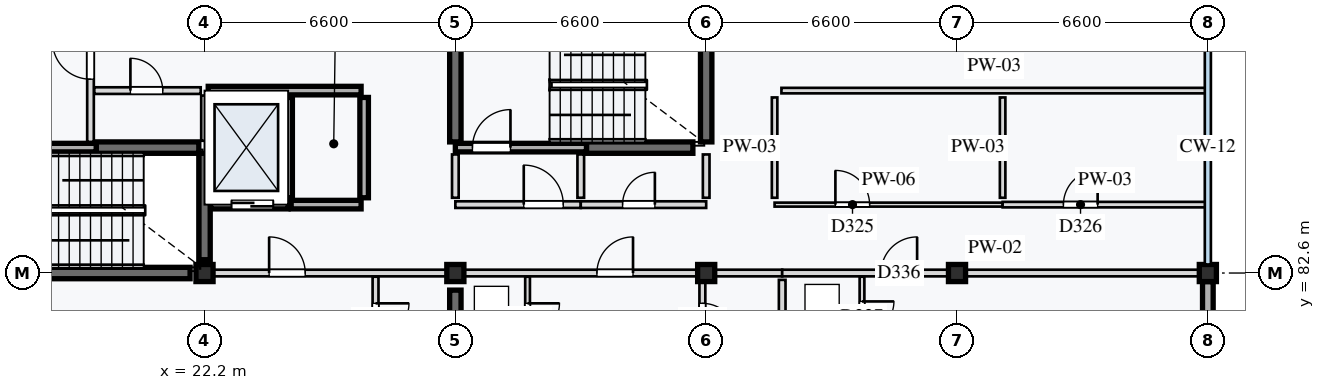
"""IFC4 building model, lengths in metres.
Left out: names, types, materials, properties, quantities, classifications, styles, units other than length and angle.
Written with IfcOpenShell. Run it as: python <this file> out.ifc"""

import sys

from ifc_helpers import new_model, si_unit, direction, frame, frame_2d, origin, origin_2d, place, context, subcontext, project, spatial, rectangle, extrude, element, fill, save


model = new_model("IFC4")
c1 = context("Model", 3, precision=1e-05, world=origin(), true_north=direction((0.0, 1.0)))
c2 = subcontext(c1, "Body", "Model", "MODEL_VIEW")
j1 = project(units=[si_unit("LENGTHUNIT", "METRE"), si_unit("PLANEANGLEUNIT", "RADIAN")], contexts=[c1])
p1 = place(None, origin())
s1 = spatial("IfcSite", under=j1, at=p1, CompositionType="ELEMENT")
p2 = place(p1, origin())
s2 = spatial("IfcBuilding", under=s1, at=p2, CompositionType="ELEMENT")
p3 = place(p2, frame((0.0, 0.0, 34.0)))
s3 = spatial("IfcBuildingStorey", under=s2, at=p3, CompositionType="ELEMENT", Elevation=34.0)
for number, where, z_axis, x_axis in (
    (1, (22.2, 82.6, 0.0), (0.0, 0.0, 1.0), (1.0, 0.0, 0.0)),
    (2, (28.8, 82.6, 0.0), (0.0, 0.0, 1.0), (1.0, 0.0, 0.0)),
    (3, (35.4, 82.6, 0.0), (0.0, 0.0, 1.0), (1.0, 0.0, 0.0)),
    (4, (42.0, 82.6, 0.0), (0.0, 0.0, 1.0), (1.0, 0.0, 0.0)),
    (5, (48.6, 82.6, 0.0), (0.0, 0.0, 1.0), (1.0, 0.0, 0.0)),
):
    element("IfcColumn", number, at=place(p3, frame(where, z_axis=z_axis, x_axis=x_axis)), inside=s3, PredefinedType="COLUMN", context=c2, shape_type="SweptSolid", body=[
        extrude(rectangle(XDim=0.45, YDim=0.45, at=origin_2d()), origin(), (0.0, 0.0, 1.0), 3.2),
    ])
p4 = place(p3, frame((15.98, 82.6, 0.0), z_axis=(0.0, 0.0, 1.0), x_axis=(1.0, 0.0, 0.0)))
e6 = element("IfcWall", 6, at=p4, inside=s3, PredefinedType="SHEAR", context=c2, shape_type="SweptSolid", body=[
    extrude(rectangle(XDim=5.84, YDim=0.3, at=frame_2d((2.92, 0.0))), origin(), (0.0, 0.0, 1.0), 2.97),
])
p5 = place(p3, frame((19.35, 85.9, 0.0), z_axis=(0.0, 0.0, 1.0), x_axis=(1.0, 0.0, 0.0)))
e7 = element("IfcWall", 7, at=p5, inside=s3, PredefinedType="SHEAR", context=c2, shape_type="SweptSolid", body=[
    extrude(rectangle(XDim=2.7, YDim=0.3, at=frame_2d((1.35, 0.0))), origin(), (0.0, 0.0, 1.0), 2.97),
])
for number, where, z_axis, x_axis in (
    (8, (22.2, 82.95, 0.0), (0.0, 0.0, 1.0), (0.0, 1.0, 0.0)),
    (9, (32.25, 85.9, 0.0), (0.0, 0.0, 1.0), (1.0, 0.0, 0.0)),
    (10, (28.8, 86.05, 0.0), (0.0, 0.0, 1.0), (0.0, 1.0, 0.0)),
    (11, (35.4, 86.05, 0.0), (0.0, 0.0, 1.0), (0.0, 1.0, 0.0)),
):
    element("IfcWall", number, at=place(p3, frame(where, z_axis=z_axis, x_axis=x_axis)), inside=s3, PredefinedType="SHEAR", context=c2, shape_type="SweptSolid", body=[
        extrude(rectangle(XDim=2.8, YDim=0.3, at=frame_2d((1.4, 0.0))), origin(), (0.0, 0.0, 1.0), 2.97),
    ])
p6 = place(p3, frame((28.8, 76.45, 0.0), z_axis=(0.0, 0.0, 1.0), x_axis=(0.0, 1.0, 0.0)))
e12 = element("IfcWall", 12, at=p6, inside=s3, PredefinedType="SHEAR", context=c2, shape_type="SweptSolid", body=[
    extrude(rectangle(XDim=5.7, YDim=0.3, at=frame_2d((2.85, 0.0))), origin(), (0.0, 0.0, 1.0), 2.97),
])
p7 = place(p3, frame((48.6, 76.225, 0.0), z_axis=(0.0, 0.0, 1.0), x_axis=(0.0, 1.0, 0.0)))
e13 = element("IfcWall", 13, at=p7, inside=s3, PredefinedType="STANDARD", context=c2, shape_type="SweptSolid", body=[
    extrude(rectangle(XDim=6.15, YDim=0.28, at=frame_2d((3.075, 0.0))), origin(), (0.0, 0.0, 1.0), 2.65),
])
p8 = place(p3, frame((15.75, 85.9, 0.0), z_axis=(0.0, 0.0, 1.0), x_axis=(1.0, 0.0, 0.0)))
e14 = element("IfcWall", 14, at=p8, inside=s3, PredefinedType="STANDARD", context=c2, shape_type="SweptSolid", body=[
    extrude(rectangle(XDim=3.6, YDim=0.225, at=frame_2d((1.8, 0.0))), origin(), (0.0, 0.0, 1.0), 2.97),
])
p9 = place(p8, frame((0.45, 0.0, 0.0)))
e15 = element("IfcOpeningElement", 15, at=p9, cuts=e14, PredefinedType="OPENING", context=c2, shape_type="SweptSolid", body=[
    extrude(rectangle(XDim=1.0, YDim=2.1, at=frame_2d((0.5, 1.05))), frame((0.0, 0.123, 0.0), z_axis=(0.0, -1.0, 0.0), x_axis=(1.0, 0.0, 0.0)), (0.0, 0.0, 1.0), 0.245),
])
p10 = place(p3, frame((19.2, 86.05, 0.0), z_axis=(0.0, 0.0, 1.0), x_axis=(0.0, 1.0, 0.0)))
e16 = element("IfcWall", 16, at=p10, inside=s3, PredefinedType="PARTITIONING", context=c2, shape_type="SweptSolid", body=[
    extrude(rectangle(XDim=3.0, YDim=0.175, at=frame_2d((1.5, 0.0))), origin(), (0.0, 0.0, 1.0), 2.97),
])
p11 = place(p10, frame((1.65, 0.0, 0.0)))
e17 = element("IfcOpeningElement", 17, at=p11, cuts=e16, PredefinedType="OPENING", context=c2, shape_type="SweptSolid", body=[
    extrude(rectangle(XDim=1.0, YDim=2.16, at=frame_2d((0.5, 1.08))), frame((0.0, 0.097, 0.0), z_axis=(0.0, -1.0, 0.0), x_axis=(1.0, 0.0, 0.0)), (0.0, 0.0, 1.0), 0.195),
])
p12 = place(p3, frame((19.3, 87.4, 0.0), z_axis=(0.0, 0.0, 1.0), x_axis=(1.0, 0.0, 0.0)))
e18 = element("IfcWall", 18, at=p12, inside=s3, PredefinedType="PARTITIONING", context=c2, shape_type="SweptSolid", body=[
    extrude(rectangle(XDim=2.8, YDim=0.175, at=frame_2d((1.4, 0.0))), origin(), (0.0, 0.0, 1.0), 2.97),
])
p13 = place(p12, frame((0.95, 0.0, 0.0)))
e19 = element("IfcOpeningElement", 19, at=p13, cuts=e18, PredefinedType="OPENING", context=c2, shape_type="SweptSolid", body=[
    extrude(rectangle(XDim=0.85, YDim=2.0, at=frame_2d((0.425, 1.0))), frame((0.0, 0.097, 0.0), z_axis=(0.0, -1.0, 0.0), x_axis=(1.0, 0.0, 0.0)), (0.0, 0.0, 1.0), 0.195),
])
p14 = place(p3, frame((22.2, 86.08, 0.0), z_axis=(0.0, 0.0, 1.0), x_axis=(0.0, 1.0, 0.0)))
e20 = element("IfcWall", 20, at=p14, inside=s3, PredefinedType="PARTITIONING", context=c2, shape_type="SweptSolid", body=[
    extrude(rectangle(XDim=1.19, YDim=0.175, at=frame_2d((0.595, 0.0))), origin(), (0.0, 0.0, 1.0), 2.97),
])
p15 = place(p3, frame((22.36, 84.4, 0.0), z_axis=(0.0, 0.0, 1.0), x_axis=(1.0, 0.0, 0.0)))
e21 = element("IfcWall", 21, at=p15, inside=s3, PredefinedType="STANDARD", context=c2, shape_type="SweptSolid", body=[
    extrude(rectangle(XDim=2.04, YDim=0.225, at=frame_2d((1.02, 0.0))), origin(), (0.0, 0.0, 1.0), 2.97),
])
p16 = place(p15, frame((0.55, 0.0, 0.0)))
e22 = element("IfcOpeningElement", 22, at=p16, cuts=e21, PredefinedType="OPENING", context=c2, shape_type="SweptSolid", body=[
    extrude(rectangle(XDim=1.1, YDim=2.1, at=frame_2d((0.55, 1.05))), frame((0.0, 0.123, 0.0), z_axis=(0.0, -1.0, 0.0), x_axis=(1.0, 0.0, 0.0)), (0.0, 0.0, 1.0), 0.245),
])
p17 = place(p3, frame((24.48, 84.4, 0.0), z_axis=(0.0, 0.0, 1.0), x_axis=(1.0, 0.0, 0.0)))
e23 = element("IfcWall", 23, at=p17, inside=s3, PredefinedType="STANDARD", context=c2, shape_type="SweptSolid", body=[
    extrude(rectangle(XDim=1.84, YDim=0.225, at=frame_2d((0.92, 0.0))), origin(), (0.0, 0.0, 1.0), 2.97),
])
p18 = place(p3, frame((22.298, 87.4, 0.0), z_axis=(0.0, 0.0, 1.0), x_axis=(1.0, 0.0, 0.0)))
e24 = element("IfcWall", 24, at=p18, inside=s3, PredefinedType="STANDARD", context=c2, shape_type="SweptSolid", body=[
    extrude(rectangle(XDim=4.022, YDim=0.225, at=frame_2d((2.011, 0.0))), origin(), (0.0, 0.0, 1.0), 2.97),
])
for number, where, z_axis, x_axis in (
    (25, (24.4, 84.58, 0.0), (0.0, 0.0, 1.0), (0.0, 1.0, 0.0)),
    (26, (26.4, 84.58, 0.0), (0.0, 0.0, 1.0), (0.0, 1.0, 0.0)),
):
    element("IfcWall", number, at=place(p3, frame(where, z_axis=z_axis, x_axis=x_axis)), inside=s3, PredefinedType="STANDARD", context=c2, shape_type="SweptSolid", body=[
        extrude(rectangle(XDim=2.64, YDim=0.225, at=frame_2d((1.32, 0.0))), origin(), (0.0, 0.0, 1.0), 2.97),
    ])
p19 = place(p3, frame((28.8, 85.9, 0.0), z_axis=(0.0, 0.0, 1.0), x_axis=(1.0, 0.0, 0.0)))
e27 = element("IfcWall", 27, at=p19, inside=s3, PredefinedType="STANDARD", context=c2, shape_type="SweptSolid", body=[
    extrude(rectangle(XDim=3.45, YDim=0.225, at=frame_2d((1.725, 0.0))), origin(), (0.0, 0.0, 1.0), 2.97),
])
p20 = place(p19, frame((0.45, 0.0, 0.0)))
e28 = element("IfcOpeningElement", 28, at=p20, cuts=e27, PredefinedType="OPENING", context=c2, shape_type="SweptSolid", body=[
    extrude(rectangle(XDim=1.0, YDim=2.16, at=frame_2d((0.5, 1.08))), frame((0.0, 0.123, 0.0), z_axis=(0.0, -1.0, 0.0), x_axis=(1.0, 0.0, 0.0)), (0.0, 0.0, 1.0), 0.245),
])
p21 = place(p3, frame((28.8, 84.4, 0.0), z_axis=(0.0, 0.0, 1.0), x_axis=(1.0, 0.0, 0.0)))
e29 = element("IfcWall", 29, at=p21, inside=s3, PredefinedType="PARTITIONING", context=c2, shape_type="SweptSolid", body=[
    extrude(rectangle(XDim=3.3, YDim=0.175, at=frame_2d((1.65, 0.0))), origin(), (0.0, 0.0, 1.0), 2.97),
])
p22 = place(p21, frame((1.8, 0.0, 0.0)))
e30 = element("IfcOpeningElement", 30, at=p22, cuts=e29, PredefinedType="OPENING", context=c2, shape_type="SweptSolid", body=[
    extrude(rectangle(XDim=1.04, YDim=2.12, at=frame_2d((0.52, 1.06))), frame((0.0, 0.097, 0.0), z_axis=(0.0, -1.0, 0.0), x_axis=(1.0, 0.0, 0.0)), (0.0, 0.0, 1.0), 0.195),
])
p23 = place(p3, frame((32.1, 84.4, 0.0), z_axis=(0.0, 0.0, 1.0), x_axis=(1.0, 0.0, 0.0)))
e31 = element("IfcWall", 31, at=p23, inside=s3, PredefinedType="PARTITIONING", context=c2, shape_type="SweptSolid", body=[
    extrude(rectangle(XDim=3.3, YDim=0.175, at=frame_2d((1.65, 0.0))), origin(), (0.0, 0.0, 1.0), 2.97),
])
p24 = place(p23, frame((1.1, 0.0, 0.0)))
e32 = element("IfcOpeningElement", 32, at=p24, cuts=e31, PredefinedType="OPENING", context=c2, shape_type="SweptSolid", body=[
    extrude(rectangle(XDim=0.85, YDim=2.0, at=frame_2d((0.425, 1.0))), frame((0.0, 0.097, 0.0), z_axis=(0.0, -1.0, 0.0), x_axis=(1.0, 0.0, 0.0)), (0.0, 0.0, 1.0), 0.195),
])
for number, where, z_axis, x_axis in (
    (33, (28.8, 84.58, 0.0), (0.0, 0.0, 1.0), (0.0, 1.0, 0.0)),
    (34, (32.1, 84.58, 0.0), (0.0, 0.0, 1.0), (0.0, 1.0, 0.0)),
    (35, (35.4, 84.58, 0.0), (0.0, 0.0, 1.0), (0.0, 1.0, 0.0)),
):
    element("IfcWall", number, at=place(p3, frame(where, z_axis=z_axis, x_axis=x_axis)), inside=s3, PredefinedType="PARTITIONING", context=c2, shape_type="SweptSolid", body=[
        extrude(rectangle(XDim=1.14, YDim=0.175, at=frame_2d((0.57, 0.0))), origin(), (0.0, 0.0, 1.0), 2.97),
    ])
p25 = place(p3, frame((37.2, 84.4, 0.0), z_axis=(0.0, 0.0, 1.0), x_axis=(1.0, 0.0, 0.0)))
e36 = element("IfcWall", 36, at=p25, inside=s3, PredefinedType="PARTITIONING", context=c2, shape_type="SweptSolid", body=[
    extrude(rectangle(XDim=6.0, YDim=0.105, at=frame_2d((3.0, 0.0))), origin(), (0.0, 0.0, 1.0), 2.97),
])
p26 = place(p25, frame((1.6, 0.0, 0.0)))
e37 = element("IfcOpeningElement", 37, at=p26, cuts=e36, PredefinedType="OPENING", context=c2, shape_type="SweptSolid", body=[
    extrude(rectangle(XDim=0.9, YDim=2.1, at=frame_2d((0.45, 1.05))), frame((0.0, 0.062, 0.0), z_axis=(0.0, -1.0, 0.0), x_axis=(1.0, 0.0, 0.0)), (0.0, 0.0, 1.0), 0.125),
])
p27 = place(p3, frame((43.2, 84.4, 0.0), z_axis=(0.0, 0.0, 1.0), x_axis=(1.0, 0.0, 0.0)))
e38 = element("IfcWall", 38, at=p27, inside=s3, PredefinedType="PARTITIONING", context=c2, shape_type="SweptSolid", body=[
    extrude(rectangle(XDim=5.4, YDim=0.145, at=frame_2d((2.7, 0.0))), origin(), (0.0, 0.0, 1.0), 2.97),
])
p28 = place(p27, frame((1.6, 0.0, 0.0)))
e39 = element("IfcOpeningElement", 39, at=p28, cuts=e38, PredefinedType="OPENING", context=c2, shape_type="SweptSolid", body=[
    extrude(rectangle(XDim=0.9, YDim=2.16, at=frame_2d((0.45, 1.08))), frame((0.0, 0.083, 0.0), z_axis=(0.0, -1.0, 0.0), x_axis=(1.0, 0.0, 0.0)), (0.0, 0.0, 1.0), 0.165),
])
p29 = place(p3, frame((43.2, 84.58, 0.0), z_axis=(0.0, 0.0, 1.0), x_axis=(0.0, 1.0, 0.0)))
e40 = element("IfcWall", 40, at=p29, inside=s3, PredefinedType="PARTITIONING", context=c2, shape_type="SweptSolid", body=[
    extrude(rectangle(XDim=2.64, YDim=0.145, at=frame_2d((1.32, 0.0))), origin(), (0.0, 0.0, 1.0), 2.97),
])
p30 = place(p3, frame((37.38, 87.4, 0.0), z_axis=(0.0, 0.0, 1.0), x_axis=(1.0, 0.0, 0.0)))
e41 = element("IfcWall", 41, at=p30, inside=s3, PredefinedType="PARTITIONING", context=c2, shape_type="SweptSolid", body=[
    extrude(rectangle(XDim=11.2, YDim=0.145, at=frame_2d((5.6, 0.0))), origin(), (0.0, 0.0, 1.0), 2.97),
])
p31 = place(p3, frame((37.2, 84.58, 0.0), z_axis=(0.0, 0.0, 1.0), x_axis=(0.0, 1.0, 0.0)))
e42 = element("IfcWall", 42, at=p31, inside=s3, PredefinedType="PARTITIONING", context=c2, shape_type="SweptSolid", body=[
    extrude(rectangle(XDim=2.64, YDim=0.145, at=frame_2d((1.32, 0.0))), origin(), (0.0, 0.0, 1.0), 2.97),
])
p32 = place(p3, frame((22.2, 82.6, 0.0), z_axis=(0.0, 0.0, 1.0), x_axis=(1.0, 0.0, 0.0)))
e43 = element("IfcWall", 43, at=p32, inside=s3, PredefinedType="PARTITIONING", context=c2, shape_type="SweptSolid", body=[
    extrude(rectangle(XDim=6.6, YDim=0.175, at=frame_2d((3.3, 0.0))), origin(), (0.0, 0.0, 1.0), 2.7),
])
p33 = place(p32, frame((1.7, 0.0, 0.0)))
e44 = element("IfcOpeningElement", 44, at=p33, cuts=e43, PredefinedType="OPENING", context=c2, shape_type="SweptSolid", body=[
    extrude(rectangle(XDim=0.95, YDim=2.1, at=frame_2d((0.475, 1.05))), frame((0.0, 0.097, 0.0), z_axis=(0.0, -1.0, 0.0), x_axis=(1.0, 0.0, 0.0)), (0.0, 0.0, 1.0), 0.195),
])
p34 = place(p3, frame((26.7, 82.502, 0.0), z_axis=(0.0, 0.0, 1.0), x_axis=(0.0, -1.0, 0.0)))
e45 = element("IfcWall", 45, at=p34, inside=s3, PredefinedType="PARTITIONING", context=c2, shape_type="SweptSolid", body=[
    extrude(rectangle(XDim=2.302, YDim=0.155, at=frame_2d((1.151, 0.0))), origin(), (0.0, 0.0, 1.0), 2.97),
])
p35 = place(p34, frame((0.7, 0.0, 0.0)))
e46 = element("IfcOpeningElement", 46, at=p35, cuts=e45, PredefinedType="OPENING", context=c2, shape_type="SweptSolid", body=[
    extrude(rectangle(XDim=0.88, YDim=2.16, at=frame_2d((0.44, 1.08))), frame((0.0, 0.087, 0.0), z_axis=(0.0, -1.0, 0.0), x_axis=(1.0, 0.0, 0.0)), (0.0, 0.0, 1.0), 0.175),
])
p36 = place(p3, frame((28.8, 82.6, 0.0), z_axis=(0.0, 0.0, 1.0), x_axis=(1.0, 0.0, 0.0)))
e47 = element("IfcWall", 47, at=p36, inside=s3, PredefinedType="PARTITIONING", context=c2, shape_type="SweptSolid", body=[
    extrude(rectangle(XDim=8.6, YDim=0.175, at=frame_2d((4.3, 0.0))), origin(), (0.0, 0.0, 1.0), 2.7),
])
p37 = place(p36, frame((3.725, 0.0, 0.0)))
e48 = element("IfcOpeningElement", 48, at=p37, cuts=e47, PredefinedType="OPENING", context=c2, shape_type="SweptSolid", body=[
    extrude(rectangle(XDim=0.95, YDim=2.16, at=frame_2d((0.475, 1.08))), frame((0.0, 0.097, 0.0), z_axis=(0.0, -1.0, 0.0), x_axis=(1.0, 0.0, 0.0)), (0.0, 0.0, 1.0), 0.195),
])
p38 = place(p3, frame((30.7, 82.502, 0.0), z_axis=(0.0, 0.0, 1.0), x_axis=(0.0, -1.0, 0.0)))
e49 = element("IfcWall", 49, at=p38, inside=s3, PredefinedType="PARTITIONING", context=c2, shape_type="SweptSolid", body=[
    extrude(rectangle(XDim=2.302, YDim=0.125, at=frame_2d((1.151, 0.0))), origin(), (0.0, 0.0, 1.0), 2.97),
])
p39 = place(p38, frame((0.7, 0.0, 0.0)))
e50 = element("IfcOpeningElement", 50, at=p39, cuts=e49, PredefinedType="OPENING", context=c2, shape_type="SweptSolid", body=[
    extrude(rectangle(XDim=0.84, YDim=2.06, at=frame_2d((0.42, 1.03))), frame((0.0, 0.073, 0.0), z_axis=(0.0, -1.0, 0.0), x_axis=(1.0, 0.0, 0.0)), (0.0, 0.0, 1.0), 0.145),
])
p40 = place(p3, frame((35.3, 82.502, 0.0), z_axis=(0.0, 0.0, 1.0), x_axis=(0.0, -1.0, 0.0)))
e51 = element("IfcWall", 51, at=p40, inside=s3, PredefinedType="PARTITIONING", context=c2, shape_type="SweptSolid", body=[
    extrude(rectangle(XDim=2.302, YDim=0.155, at=frame_2d((1.151, 0.0))), origin(), (0.0, 0.0, 1.0), 2.97),
])
p41 = place(p40, frame((0.7, 0.0, 0.0)))
e52 = element("IfcOpeningElement", 52, at=p41, cuts=e51, PredefinedType="OPENING", context=c2, shape_type="SweptSolid", body=[
    extrude(rectangle(XDim=0.9, YDim=2.1, at=frame_2d((0.45, 1.05))), frame((0.0, 0.087, 0.0), z_axis=(0.0, -1.0, 0.0), x_axis=(1.0, 0.0, 0.0)), (0.0, 0.0, 1.0), 0.175),
])
p42 = place(p3, frame((37.4, 82.42, 0.0), z_axis=(0.0, 0.0, 1.0), x_axis=(0.0, -1.0, 0.0)))
e53 = element("IfcWall", 53, at=p42, inside=s3, PredefinedType="PARTITIONING", context=c2, shape_type="SweptSolid", body=[
    extrude(rectangle(XDim=2.132, YDim=0.175, at=frame_2d((1.066, 0.0))), origin(), (0.0, 0.0, 1.0), 2.97),
])
p43 = place(p3, frame((37.4, 82.6, 0.0), z_axis=(0.0, 0.0, 1.0), x_axis=(1.0, 0.0, 0.0)))
e54 = element("IfcWall", 54, at=p43, inside=s3, PredefinedType="PARTITIONING", context=c2, shape_type="SweptSolid", body=[
    extrude(rectangle(XDim=11.2, YDim=0.175, at=frame_2d((5.6, 0.0))), origin(), (0.0, 0.0, 1.0), 2.7),
])
p44 = place(p43, frame((2.6, 0.0, 0.0)))
e55 = element("IfcOpeningElement", 55, at=p44, cuts=e54, PredefinedType="OPENING", context=c2, shape_type="SweptSolid", body=[
    extrude(rectangle(XDim=0.95, YDim=2.16, at=frame_2d((0.475, 1.08))), frame((0.0, 0.097, 0.0), z_axis=(0.0, -1.0, 0.0), x_axis=(1.0, 0.0, 0.0)), (0.0, 0.0, 1.0), 0.195),
])
p45 = place(p3, frame((39.5, 82.502, 0.0), z_axis=(0.0, 0.0, 1.0), x_axis=(0.0, -1.0, 0.0)))
e56 = element("IfcWall", 56, at=p45, inside=s3, PredefinedType="PARTITIONING", context=c2, shape_type="SweptSolid", body=[
    extrude(rectangle(XDim=2.202, YDim=0.125, at=frame_2d((1.101, 0.0))), origin(), (0.0, 0.0, 1.0), 2.97),
])
p46 = place(p45, frame((0.65, 0.0, 0.0)))
e57 = element("IfcOpeningElement", 57, at=p46, cuts=e56, PredefinedType="OPENING", context=c2, shape_type="SweptSolid", body=[
    extrude(rectangle(XDim=0.84, YDim=2.06, at=frame_2d((0.42, 1.03))), frame((0.0, 0.073, 0.0), z_axis=(0.0, -1.0, 0.0), x_axis=(1.0, 0.0, 0.0)), (0.0, 0.0, 1.0), 0.145),
])
p47 = place(p11, origin())
e58 = element("IfcDoor", 58, at=p47, inside=s3, OperationType="SINGLE_SWING_RIGHT", PredefinedType="DOOR", context=c2, shape_type="SweptSolid", body=[
    extrude(rectangle(XDim=1.0, YDim=2.16, at=frame_2d((0.5, 1.08))), frame((0.0, 0.025, 0.0), z_axis=(0.0, -1.0, 0.0), x_axis=(1.0, 0.0, 0.0)), (0.0, 0.0, 1.0), 0.05),
])
fill(e17, e58)
p48 = place(p13, origin())
e59 = element("IfcDoor", 59, at=p48, inside=s3, OperationType="SINGLE_SWING_LEFT", PredefinedType="DOOR", context=c2, shape_type="SweptSolid", body=[
    extrude(rectangle(XDim=0.85, YDim=2.0, at=frame_2d((0.425, 1.0))), frame((0.0, 0.025, 0.0), z_axis=(0.0, -1.0, 0.0), x_axis=(1.0, 0.0, 0.0)), (0.0, 0.0, 1.0), 0.05),
])
fill(e19, e59)
p49 = place(p16, origin())
e60 = element("IfcDoor", 60, at=p49, inside=s3, OperationType="DOUBLE_DOOR_SLIDING", PredefinedType="DOOR", context=c2, shape_type="SweptSolid", body=[
    extrude(rectangle(XDim=1.1, YDim=2.1, at=frame_2d((0.55, 1.05))), frame((0.0, 0.025, 0.0), z_axis=(0.0, -1.0, 0.0), x_axis=(1.0, 0.0, 0.0)), (0.0, 0.0, 1.0), 0.05),
])
fill(e22, e60)
p50 = place(p20, origin())
e61 = element("IfcDoor", 61, at=p50, inside=s3, OperationType="SINGLE_SWING_RIGHT", PredefinedType="DOOR", context=c2, shape_type="SweptSolid", body=[
    extrude(rectangle(XDim=1.0, YDim=2.16, at=frame_2d((0.5, 1.08))), frame((0.0, 0.025, 0.0), z_axis=(0.0, -1.0, 0.0), x_axis=(1.0, 0.0, 0.0)), (0.0, 0.0, 1.0), 0.05),
])
fill(e28, e61)
p51 = place(p22, origin())
e62 = element("IfcDoor", 62, at=p51, inside=s3, OperationType="SINGLE_SWING_LEFT", PredefinedType="DOOR", context=c2, shape_type="SweptSolid", body=[
    extrude(rectangle(XDim=1.04, YDim=2.12, at=frame_2d((0.52, 1.06))), frame((0.0, 0.025, 0.0), z_axis=(0.0, -1.0, 0.0), x_axis=(1.0, 0.0, 0.0)), (0.0, 0.0, 1.0), 0.05),
])
fill(e30, e62)
p52 = place(p24, origin())
e63 = element("IfcDoor", 63, at=p52, inside=s3, OperationType="SINGLE_SWING_RIGHT", PredefinedType="DOOR", context=c2, shape_type="SweptSolid", body=[
    extrude(rectangle(XDim=0.85, YDim=2.0, at=frame_2d((0.425, 1.0))), frame((0.0, 0.025, 0.0), z_axis=(0.0, -1.0, 0.0), x_axis=(1.0, 0.0, 0.0)), (0.0, 0.0, 1.0), 0.05),
])
fill(e32, e63)
p53 = place(p26, origin())
e64 = element("IfcDoor", 64, at=p53, inside=s3, OperationType="SINGLE_SWING_LEFT", PredefinedType="DOOR", context=c2, shape_type="SweptSolid", body=[
    extrude(rectangle(XDim=0.9, YDim=2.1, at=frame_2d((0.45, 1.05))), frame((0.0, 0.025, 0.0), z_axis=(0.0, -1.0, 0.0), x_axis=(1.0, 0.0, 0.0)), (0.0, 0.0, 1.0), 0.05),
])
fill(e37, e64)
p54 = place(p28, origin())
e65 = element("IfcDoor", 65, at=p54, inside=s3, OperationType="SINGLE_SWING_RIGHT", PredefinedType="DOOR", context=c2, shape_type="SweptSolid", body=[
    extrude(rectangle(XDim=0.9, YDim=2.16, at=frame_2d((0.45, 1.08))), frame((0.0, 0.025, 0.0), z_axis=(0.0, -1.0, 0.0), x_axis=(1.0, 0.0, 0.0)), (0.0, 0.0, 1.0), 0.05),
])
fill(e39, e65)
p55 = place(p33, origin())
e66 = element("IfcDoor", 66, at=p55, inside=s3, OperationType="SINGLE_SWING_LEFT", PredefinedType="DOOR", context=c2, shape_type="SweptSolid", body=[
    extrude(rectangle(XDim=0.95, YDim=2.1, at=frame_2d((0.475, 1.05))), frame((0.0, 0.025, 0.0), z_axis=(0.0, -1.0, 0.0), x_axis=(1.0, 0.0, 0.0)), (0.0, 0.0, 1.0), 0.05),
])
fill(e44, e66)
p56 = place(p35, origin())
e67 = element("IfcDoor", 67, at=p56, inside=s3, OperationType="SINGLE_SWING_LEFT", PredefinedType="DOOR", context=c2, shape_type="SweptSolid", body=[
    extrude(rectangle(XDim=0.88, YDim=2.16, at=frame_2d((0.44, 1.08))), frame((0.0, 0.025, 0.0), z_axis=(0.0, -1.0, 0.0), x_axis=(1.0, 0.0, 0.0)), (0.0, 0.0, 1.0), 0.05),
])
fill(e46, e67)
p57 = place(p37, origin())
e68 = element("IfcDoor", 68, at=p57, inside=s3, OperationType="SINGLE_SWING_RIGHT", PredefinedType="DOOR", context=c2, shape_type="SweptSolid", body=[
    extrude(rectangle(XDim=0.95, YDim=2.16, at=frame_2d((0.475, 1.08))), frame((0.0, 0.025, 0.0), z_axis=(0.0, -1.0, 0.0), x_axis=(1.0, 0.0, 0.0)), (0.0, 0.0, 1.0), 0.05),
])
fill(e48, e68)
p58 = place(p39, origin())
e69 = element("IfcDoor", 69, at=p58, inside=s3, OperationType="SINGLE_SWING_LEFT", PredefinedType="DOOR", context=c2, shape_type="SweptSolid", body=[
    extrude(rectangle(XDim=0.84, YDim=2.06, at=frame_2d((0.42, 1.03))), frame((0.0, 0.025, 0.0), z_axis=(0.0, -1.0, 0.0), x_axis=(1.0, 0.0, 0.0)), (0.0, 0.0, 1.0), 0.05),
])
fill(e50, e69)
p59 = place(p41, origin())
e70 = element("IfcDoor", 70, at=p59, inside=s3, OperationType="SINGLE_SWING_RIGHT", PredefinedType="DOOR", context=c2, shape_type="SweptSolid", body=[
    extrude(rectangle(XDim=0.9, YDim=2.1, at=frame_2d((0.45, 1.05))), frame((0.0, 0.025, 0.0), z_axis=(0.0, -1.0, 0.0), x_axis=(1.0, 0.0, 0.0)), (0.0, 0.0, 1.0), 0.05),
])
fill(e52, e70)
p60 = place(p44, origin())
e71 = element("IfcDoor", 71, at=p60, inside=s3, OperationType="SINGLE_SWING_RIGHT", PredefinedType="DOOR", context=c2, shape_type="SweptSolid", body=[
    extrude(rectangle(XDim=0.95, YDim=2.16, at=frame_2d((0.475, 1.08))), frame((0.0, 0.025, 0.0), z_axis=(0.0, -1.0, 0.0), x_axis=(1.0, 0.0, 0.0)), (0.0, 0.0, 1.0), 0.05),
])
fill(e55, e71)
p61 = place(p46, origin())
e72 = element("IfcDoor", 72, at=p61, inside=s3, OperationType="SINGLE_SWING_LEFT", PredefinedType="DOOR", context=c2, shape_type="SweptSolid", body=[
    extrude(rectangle(XDim=0.84, YDim=2.06, at=frame_2d((0.42, 1.03))), frame((0.0, 0.025, 0.0), z_axis=(0.0, -1.0, 0.0), x_axis=(1.0, 0.0, 0.0)), (0.0, 0.0, 1.0), 0.05),
])
fill(e57, e72)
save(model, sys.argv[1])
